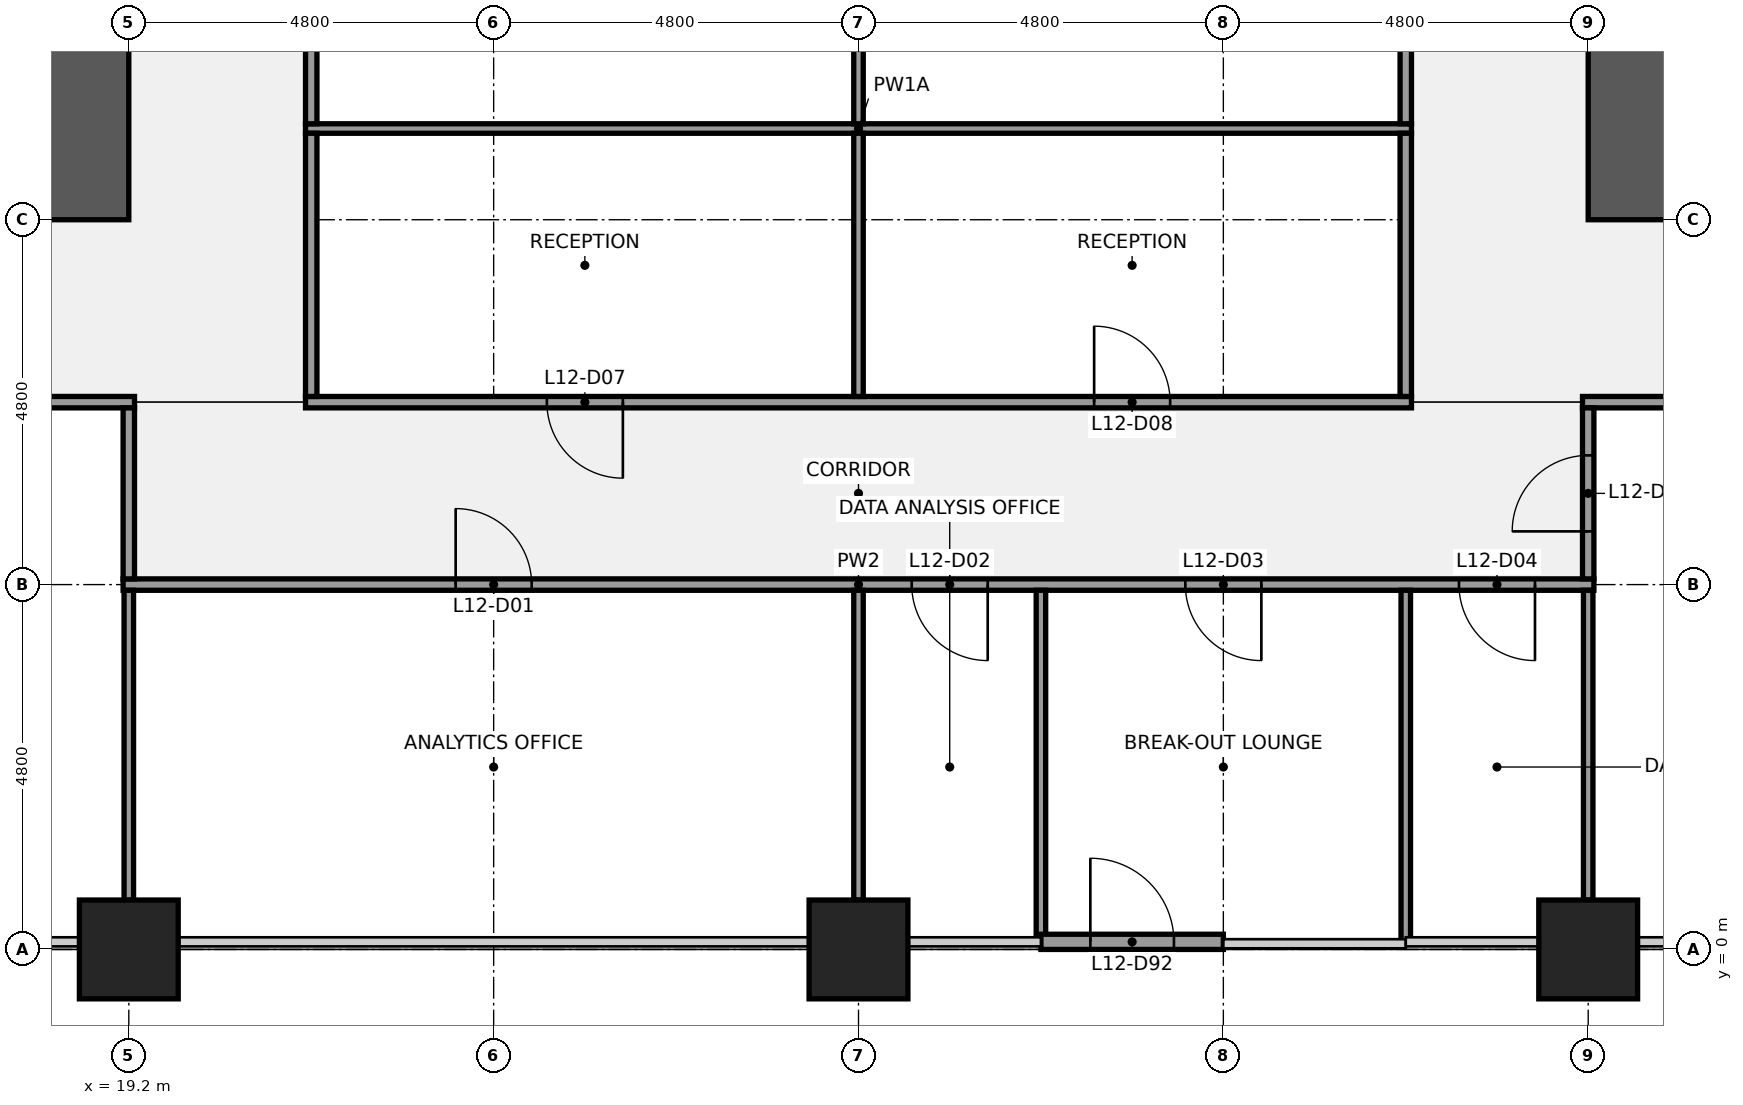
"""IFC4 building model, lengths in metres.
Left out: names, types, materials, properties, quantities, classifications, styles, units other than length and angle.
Written with IfcOpenShell. Run it as: python <this file> out.ifc"""

import sys

from ifc_helpers import new_model, si_unit, direction, frame, frame_2d, origin, origin_2d, place, context, subcontext, project, spatial, rectangle, extrude, element, fill, save


model = new_model("IFC4")
c1 = context("Model", 3, precision=1e-05, world=origin(), true_north=direction((0.0, 1.0)))
c2 = subcontext(c1, "Body", "Model", "MODEL_VIEW")
j1 = project(units=[si_unit("LENGTHUNIT", "METRE"), si_unit("PLANEANGLEUNIT", "RADIAN")], contexts=[c1])
p1 = place(None, origin())
s1 = spatial("IfcSite", under=j1, at=p1, CompositionType="ELEMENT")
p2 = place(p1, origin())
s2 = spatial("IfcBuilding", under=s1, at=p2, CompositionType="ELEMENT")
p3 = place(p2, frame((0.0, 0.0, 59.0)))
s3 = spatial("IfcBuildingStorey", under=s2, at=p3, CompositionType="ELEMENT", Elevation=59.0)
for number, where, z_axis, x_axis in (
    (1, (19.2, 0.0, 0.0), (0.0, 0.0, 1.0), (1.0, 0.0, 0.0)),
    (2, (28.8, 0.0, 0.0), (0.0, 0.0, 1.0), (1.0, 0.0, 0.0)),
    (3, (38.4, 0.0, 0.0), (0.0, 0.0, 1.0), (1.0, 0.0, 0.0)),
):
    element("IfcColumn", number, at=place(p3, frame(where, z_axis=z_axis, x_axis=x_axis)), inside=s3, PredefinedType="COLUMN", context=c2, shape_type="SweptSolid", body=[
        extrude(rectangle(XDim=1.3, YDim=1.3, at=origin_2d()), origin(), (0.0, 0.0, 1.0), 4.0),
    ])
p4 = place(p3, frame((18.6, 38.4, 0.0), z_axis=(0.0, 0.0, 1.0), x_axis=(0.0, -1.0, 0.0)))
e4 = element("IfcWall", 4, at=p4, inside=s3, PredefinedType="SHEAR", context=c2, shape_type="SweptSolid", body=[
    extrude(rectangle(XDim=28.8, YDim=1.2, at=frame_2d((14.4, 0.0))), origin(), (0.0, 0.0, 1.0), 3.84),
])
p5 = place(p4, frame((18.3, 0.0, 0.0)))
e5 = element("IfcOpeningElement", 5, at=p5, cuts=e4, PredefinedType="OPENING", context=c2, shape_type="SweptSolid", body=[
    extrude(rectangle(XDim=1.8, YDim=2.1, at=frame_2d((0.9, 1.05))), frame((0.0, 0.61, 0.0), z_axis=(0.0, -1.0, 0.0), x_axis=(1.0, 0.0, 0.0)), (0.0, 0.0, 1.0), 1.22),
])
p6 = place(p4, frame((8.7, 0.0, 0.0)))
e6 = element("IfcOpeningElement", 6, at=p6, cuts=e4, PredefinedType="OPENING", context=c2, shape_type="SweptSolid", body=[
    extrude(rectangle(XDim=1.8, YDim=2.1, at=frame_2d((0.9, 1.05))), frame((0.0, 0.61, 0.0), z_axis=(0.0, -1.0, 0.0), x_axis=(1.0, 0.0, 0.0)), (0.0, 0.0, 1.0), 1.22),
])
p7 = place(p3, frame((39.0, 9.6, 0.0), z_axis=(0.0, 0.0, 1.0), x_axis=(0.0, 1.0, 0.0)))
e7 = element("IfcWall", 7, at=p7, inside=s3, PredefinedType="SHEAR", context=c2, shape_type="SweptSolid", body=[
    extrude(rectangle(XDim=28.8, YDim=1.2, at=frame_2d((14.4, 0.0))), origin(), (0.0, 0.0, 1.0), 3.84),
])
p8 = place(p7, frame((8.7, 0.0, 0.0)))
e8 = element("IfcOpeningElement", 8, at=p8, cuts=e7, PredefinedType="OPENING", context=c2, shape_type="SweptSolid", body=[
    extrude(rectangle(XDim=1.8, YDim=2.1, at=frame_2d((0.9, 1.05))), frame((0.0, 0.61, 0.0), z_axis=(0.0, -1.0, 0.0), x_axis=(1.0, 0.0, 0.0)), (0.0, 0.0, 1.0), 1.22),
])
p9 = place(p7, frame((18.3, 0.0, 0.0)))
e9 = element("IfcOpeningElement", 9, at=p9, cuts=e7, PredefinedType="OPENING", context=c2, shape_type="SweptSolid", body=[
    extrude(rectangle(XDim=1.8, YDim=2.1, at=frame_2d((0.9, 1.05))), frame((0.0, 0.61, 0.0), z_axis=(0.0, -1.0, 0.0), x_axis=(1.0, 0.0, 0.0)), (0.0, 0.0, 1.0), 1.22),
])
p10 = place(p3, frame((19.125, 4.8, 0.0), z_axis=(0.0, 0.0, 1.0), x_axis=(1.0, 0.0, 0.0)))
e10 = element("IfcWall", 10, at=p10, inside=s3, PredefinedType="PARTITIONING", context=c2, shape_type="SweptSolid", body=[
    extrude(rectangle(XDim=19.35, YDim=0.15, at=frame_2d((9.675, 0.0))), origin(), (0.0, 0.0, 1.0), 2.87),
])
p11 = place(p10, frame((4.375, 0.0, 0.0)))
e11 = element("IfcOpeningElement", 11, at=p11, cuts=e10, PredefinedType="OPENING", context=c2, shape_type="SweptSolid", body=[
    extrude(rectangle(XDim=1.0, YDim=2.1, at=frame_2d((0.5, 1.05))), frame((0.0, 0.085, 0.0), z_axis=(0.0, -1.0, 0.0), x_axis=(1.0, 0.0, 0.0)), (0.0, 0.0, 1.0), 0.17),
])
p12 = place(p10, frame((10.375, 0.0, 0.0)))
e12 = element("IfcOpeningElement", 12, at=p12, cuts=e10, PredefinedType="OPENING", context=c2, shape_type="SweptSolid", body=[
    extrude(rectangle(XDim=1.0, YDim=2.1, at=frame_2d((0.5, 1.05))), frame((0.0, 0.085, 0.0), z_axis=(0.0, -1.0, 0.0), x_axis=(1.0, 0.0, 0.0)), (0.0, 0.0, 1.0), 0.17),
])
p13 = place(p10, frame((13.975, 0.0, 0.0)))
e13 = element("IfcOpeningElement", 13, at=p13, cuts=e10, PredefinedType="OPENING", context=c2, shape_type="SweptSolid", body=[
    extrude(rectangle(XDim=1.0, YDim=2.1, at=frame_2d((0.5, 1.05))), frame((0.0, 0.085, 0.0), z_axis=(0.0, -1.0, 0.0), x_axis=(1.0, 0.0, 0.0)), (0.0, 0.0, 1.0), 0.17),
])
p14 = place(p10, frame((17.575, 0.0, 0.0)))
e14 = element("IfcOpeningElement", 14, at=p14, cuts=e10, PredefinedType="OPENING", context=c2, shape_type="SweptSolid", body=[
    extrude(rectangle(XDim=1.0, YDim=2.1, at=frame_2d((0.5, 1.05))), frame((0.0, 0.085, 0.0), z_axis=(0.0, -1.0, 0.0), x_axis=(1.0, 0.0, 0.0)), (0.0, 0.0, 1.0), 0.17),
])
p15 = place(p3, frame((9.525, 7.2, 0.0), z_axis=(0.0, 0.0, 1.0), x_axis=(1.0, 0.0, 0.0)))
e15 = element("IfcWall", 15, at=p15, inside=s3, PredefinedType="PARTITIONING", context=c2, shape_type="SweptSolid", body=[
    extrude(rectangle(XDim=9.75, YDim=0.15, at=frame_2d((4.875, 0.0))), origin(), (0.0, 0.0, 1.0), 2.87),
])
p16 = place(p15, frame((1.975, 0.0, 0.0)))
e16 = element("IfcOpeningElement", 16, at=p16, cuts=e15, PredefinedType="OPENING", context=c2, shape_type="SweptSolid", body=[
    extrude(rectangle(XDim=1.0, YDim=2.1, at=frame_2d((0.5, 1.05))), frame((0.0, 0.085, 0.0), z_axis=(0.0, -1.0, 0.0), x_axis=(1.0, 0.0, 0.0)), (0.0, 0.0, 1.0), 0.17),
])
p17 = place(p15, frame((6.775, 0.0, 0.0)))
e17 = element("IfcOpeningElement", 17, at=p17, cuts=e15, PredefinedType="OPENING", context=c2, shape_type="SweptSolid", body=[
    extrude(rectangle(XDim=1.0, YDim=2.1, at=frame_2d((0.5, 1.05))), frame((0.0, 0.085, 0.0), z_axis=(0.0, -1.0, 0.0), x_axis=(1.0, 0.0, 0.0)), (0.0, 0.0, 1.0), 0.17),
])
p18 = place(p3, frame((21.525, 7.2, 0.0), z_axis=(0.0, 0.0, 1.0), x_axis=(1.0, 0.0, 0.0)))
e18 = element("IfcWall", 18, at=p18, inside=s3, PredefinedType="PARTITIONING", context=c2, shape_type="SweptSolid", body=[
    extrude(rectangle(XDim=14.55, YDim=0.15, at=frame_2d((7.275, 0.0))), origin(), (0.0, 0.0, 1.0), 2.87),
])
p19 = place(p18, frame((3.175, 0.0, 0.0)))
e19 = element("IfcOpeningElement", 19, at=p19, cuts=e18, PredefinedType="OPENING", context=c2, shape_type="SweptSolid", body=[
    extrude(rectangle(XDim=1.0, YDim=2.1, at=frame_2d((0.5, 1.05))), frame((0.0, 0.085, 0.0), z_axis=(0.0, -1.0, 0.0), x_axis=(1.0, 0.0, 0.0)), (0.0, 0.0, 1.0), 0.17),
])
p20 = place(p18, frame((10.375, 0.0, 0.0)))
e20 = element("IfcOpeningElement", 20, at=p20, cuts=e18, PredefinedType="OPENING", context=c2, shape_type="SweptSolid", body=[
    extrude(rectangle(XDim=1.0, YDim=2.1, at=frame_2d((0.5, 1.05))), frame((0.0, 0.085, 0.0), z_axis=(0.0, -1.0, 0.0), x_axis=(1.0, 0.0, 0.0)), (0.0, 0.0, 1.0), 0.17),
])
p21 = place(p3, frame((38.325, 7.2, 0.0), z_axis=(0.0, 0.0, 1.0), x_axis=(1.0, 0.0, 0.0)))
e21 = element("IfcWall", 21, at=p21, inside=s3, PredefinedType="PARTITIONING", context=c2, shape_type="SweptSolid", body=[
    extrude(rectangle(XDim=9.75, YDim=0.15, at=frame_2d((4.875, 0.0))), origin(), (0.0, 0.0, 1.0), 2.87),
])
p22 = place(p21, frame((5.575, 0.0, 0.0)))
e22 = element("IfcOpeningElement", 22, at=p22, cuts=e21, PredefinedType="OPENING", context=c2, shape_type="SweptSolid", body=[
    extrude(rectangle(XDim=1.0, YDim=2.1, at=frame_2d((0.5, 1.05))), frame((0.0, 0.085, 0.0), z_axis=(0.0, -1.0, 0.0), x_axis=(1.0, 0.0, 0.0)), (0.0, 0.0, 1.0), 0.17),
])
p23 = place(p3, frame((21.525, 10.8, 0.0), z_axis=(0.0, 0.0, 1.0), x_axis=(1.0, 0.0, 0.0)))
e23 = element("IfcWall", 23, at=p23, inside=s3, PredefinedType="PARTITIONING", context=c2, shape_type="SweptSolid", body=[
    extrude(rectangle(XDim=14.55, YDim=0.125, at=frame_2d((7.275, 0.0))), origin(), (0.0, 0.0, 1.0), 2.87),
])
p24 = place(p3, frame((19.2, 0.65, 0.0), z_axis=(0.0, 0.0, 1.0), x_axis=(0.0, 1.0, 0.0)))
e24 = element("IfcWall", 24, at=p24, inside=s3, PredefinedType="PARTITIONING", context=c2, shape_type="SweptSolid", body=[
    extrude(rectangle(XDim=4.075, YDim=0.125, at=frame_2d((2.038, 0.0))), origin(), (0.0, 0.0, 1.0), 2.87),
])
p25 = place(p3, frame((19.2, 4.875, 0.0), z_axis=(0.0, 0.0, 1.0), x_axis=(0.0, 1.0, 0.0)))
e25 = element("IfcWall", 25, at=p25, inside=s3, PredefinedType="PARTITIONING", context=c2, shape_type="SweptSolid", body=[
    extrude(rectangle(XDim=2.25, YDim=0.15, at=frame_2d((1.125, 0.0))), origin(), (0.0, 0.0, 1.0), 2.87),
])
p26 = place(p3, frame((21.6, 7.275, 0.0), z_axis=(0.0, 0.0, 1.0), x_axis=(0.0, 1.0, 0.0)))
e26 = element("IfcWall", 26, at=p26, inside=s3, PredefinedType="PARTITIONING", context=c2, shape_type="SweptSolid", body=[
    extrude(rectangle(XDim=3.463, YDim=0.15, at=frame_2d((1.731, 0.0))), origin(), (0.0, 0.0, 1.0), 2.87),
])
p27 = place(p3, frame((21.6, 10.863, 0.0), z_axis=(0.0, 0.0, 1.0), x_axis=(0.0, 1.0, 0.0)))
e27 = element("IfcWall", 27, at=p27, inside=s3, PredefinedType="PARTITIONING", context=c2, shape_type="SweptSolid", body=[
    extrude(rectangle(XDim=7.075, YDim=0.15, at=frame_2d((3.538, 0.0))), origin(), (0.0, 0.0, 1.0), 2.87),
])
p28 = place(p27, frame((3.038, 0.0, 0.0)))
e28 = element("IfcOpeningElement", 28, at=p28, cuts=e27, PredefinedType="OPENING", context=c2, shape_type="SweptSolid", body=[
    extrude(rectangle(XDim=1.0, YDim=2.1, at=frame_2d((0.5, 1.05))), frame((0.0, 0.085, 0.0), z_axis=(0.0, -1.0, 0.0), x_axis=(1.0, 0.0, 0.0)), (0.0, 0.0, 1.0), 0.17),
])
p29 = place(p3, frame((28.8, 0.65, 0.0), z_axis=(0.0, 0.0, 1.0), x_axis=(0.0, 1.0, 0.0)))
e29 = element("IfcWall", 29, at=p29, inside=s3, PredefinedType="PARTITIONING", context=c2, shape_type="SweptSolid", body=[
    extrude(rectangle(XDim=4.075, YDim=0.125, at=frame_2d((2.038, 0.0))), origin(), (0.0, 0.0, 1.0), 2.87),
])
p30 = place(p3, frame((28.8, 7.275, 0.0), z_axis=(0.0, 0.0, 1.0), x_axis=(0.0, 1.0, 0.0)))
e30 = element("IfcWall", 30, at=p30, inside=s3, PredefinedType="PARTITIONING", context=c2, shape_type="SweptSolid", body=[
    extrude(rectangle(XDim=3.463, YDim=0.125, at=frame_2d((1.731, 0.0))), origin(), (0.0, 0.0, 1.0), 2.87),
])
p31 = place(p3, frame((28.8, 10.863, 0.0), z_axis=(0.0, 0.0, 1.0), x_axis=(0.0, 1.0, 0.0)))
e31 = element("IfcWall", 31, at=p31, inside=s3, PredefinedType="PARTITIONING", context=c2, shape_type="SweptSolid", body=[
    extrude(rectangle(XDim=7.075, YDim=0.125, at=frame_2d((3.538, 0.0))), origin(), (0.0, 0.0, 1.0), 2.87),
])
for number, where, z_axis, x_axis in (
    (32, (31.2, 0.1, 0.0), (0.0, 0.0, 1.0), (0.0, 1.0, 0.0)),
    (33, (36.0, 0.1, 0.0), (0.0, 0.0, 1.0), (0.0, 1.0, 0.0)),
):
    element("IfcWall", number, at=place(p3, frame(where, z_axis=z_axis, x_axis=x_axis)), inside=s3, PredefinedType="PARTITIONING", context=c2, shape_type="SweptSolid", body=[
        extrude(rectangle(XDim=4.625, YDim=0.125, at=frame_2d((2.312, 0.0))), origin(), (0.0, 0.0, 1.0), 2.87),
    ])
p32 = place(p3, frame((36.0, 7.275, 0.0), z_axis=(0.0, 0.0, 1.0), x_axis=(0.0, 1.0, 0.0)))
e34 = element("IfcWall", 34, at=p32, inside=s3, PredefinedType="PARTITIONING", context=c2, shape_type="SweptSolid", body=[
    extrude(rectangle(XDim=3.463, YDim=0.15, at=frame_2d((1.731, 0.0))), origin(), (0.0, 0.0, 1.0), 2.87),
])
p33 = place(p3, frame((36.0, 10.863, 0.0), z_axis=(0.0, 0.0, 1.0), x_axis=(0.0, 1.0, 0.0)))
e35 = element("IfcWall", 35, at=p33, inside=s3, PredefinedType="PARTITIONING", context=c2, shape_type="SweptSolid", body=[
    extrude(rectangle(XDim=7.075, YDim=0.15, at=frame_2d((3.538, 0.0))), origin(), (0.0, 0.0, 1.0), 2.87),
])
p34 = place(p33, frame((3.038, 0.0, 0.0)))
e36 = element("IfcOpeningElement", 36, at=p34, cuts=e35, PredefinedType="OPENING", context=c2, shape_type="SweptSolid", body=[
    extrude(rectangle(XDim=1.0, YDim=2.1, at=frame_2d((0.5, 1.05))), frame((0.0, 0.085, 0.0), z_axis=(0.0, -1.0, 0.0), x_axis=(1.0, 0.0, 0.0)), (0.0, 0.0, 1.0), 0.17),
])
p35 = place(p3, frame((38.4, 0.65, 0.0), z_axis=(0.0, 0.0, 1.0), x_axis=(0.0, 1.0, 0.0)))
e37 = element("IfcWall", 37, at=p35, inside=s3, PredefinedType="PARTITIONING", context=c2, shape_type="SweptSolid", body=[
    extrude(rectangle(XDim=4.075, YDim=0.125, at=frame_2d((2.038, 0.0))), origin(), (0.0, 0.0, 1.0), 2.87),
])
p36 = place(p3, frame((38.4, 4.875, 0.0), z_axis=(0.0, 0.0, 1.0), x_axis=(0.0, 1.0, 0.0)))
e38 = element("IfcWall", 38, at=p36, inside=s3, PredefinedType="PARTITIONING", context=c2, shape_type="SweptSolid", body=[
    extrude(rectangle(XDim=2.25, YDim=0.15, at=frame_2d((1.125, 0.0))), origin(), (0.0, 0.0, 1.0), 2.87),
])
p37 = place(p36, frame((0.625, 0.0, 0.0)))
e39 = element("IfcOpeningElement", 39, at=p37, cuts=e38, PredefinedType="OPENING", context=c2, shape_type="SweptSolid", body=[
    extrude(rectangle(XDim=1.0, YDim=2.1, at=frame_2d((0.5, 1.05))), frame((0.0, 0.085, 0.0), z_axis=(0.0, -1.0, 0.0), x_axis=(1.0, 0.0, 0.0)), (0.0, 0.0, 1.0), 0.17),
])
p38 = place(p3, frame((31.2, 0.1, 0.0), z_axis=(0.0, 0.0, 1.0), x_axis=(1.0, 0.0, 0.0)))
e40 = element("IfcWall", 40, at=p38, inside=s3, PredefinedType="SOLIDWALL", context=c2, shape_type="SweptSolid", body=[
    extrude(rectangle(XDim=2.4, YDim=0.2, at=frame_2d((1.2, 0.0))), origin(), (0.0, 0.0, 1.0), 3.314),
])
p39 = place(p38, frame((0.65, 0.0, 0.0)))
e41 = element("IfcOpeningElement", 41, at=p39, cuts=e40, PredefinedType="OPENING", context=c2, shape_type="SweptSolid", body=[
    extrude(rectangle(XDim=1.1, YDim=2.1, at=frame_2d((0.55, 1.05))), frame((0.0, 0.11, 0.0), z_axis=(0.0, -1.0, 0.0), x_axis=(1.0, 0.0, 0.0)), (0.0, 0.0, 1.0), 0.22),
])
for number, where, z_axis, x_axis in (
    (42, (19.2, -1.075, 0.0), (0.0, 0.0, 1.0), (1.0, 0.0, 0.0)),
    (43, (38.4, -1.075, 0.0), (0.0, 0.0, 1.0), (1.0, 0.0, 0.0)),
):
    element("IfcColumn", number, at=place(p3, frame(where, z_axis=z_axis, x_axis=x_axis)), inside=s3, PredefinedType="PILASTER", context=c2, shape_type="SweptSolid", body=[
        extrude(rectangle(XDim=4.2, YDim=0.85, at=origin_2d()), origin(), (0.0, 0.0, 1.0), 4.0),
    ])
p40 = place(p11, origin())
e44 = element("IfcDoor", 44, at=p40, inside=s3, OperationType="SINGLE_SWING_LEFT", PredefinedType="DOOR", context=c2, shape_type="SweptSolid", body=[
    extrude(rectangle(XDim=1.0, YDim=2.1, at=frame_2d((0.5, 1.05))), frame((0.0, 0.025, 0.0), z_axis=(0.0, -1.0, 0.0), x_axis=(1.0, 0.0, 0.0)), (0.0, 0.0, 1.0), 0.05),
])
fill(e11, e44)
p41 = place(p12, origin())
e45 = element("IfcDoor", 45, at=p41, inside=s3, OperationType="SINGLE_SWING_RIGHT", PredefinedType="DOOR", context=c2, shape_type="SweptSolid", body=[
    extrude(rectangle(XDim=1.0, YDim=2.1, at=frame_2d((0.5, 1.05))), frame((0.0, 0.025, 0.0), z_axis=(0.0, -1.0, 0.0), x_axis=(1.0, 0.0, 0.0)), (0.0, 0.0, 1.0), 0.05),
])
fill(e12, e45)
p42 = place(p13, origin())
e46 = element("IfcDoor", 46, at=p42, inside=s3, OperationType="SINGLE_SWING_RIGHT", PredefinedType="DOOR", context=c2, shape_type="SweptSolid", body=[
    extrude(rectangle(XDim=1.0, YDim=2.1, at=frame_2d((0.5, 1.05))), frame((0.0, 0.025, 0.0), z_axis=(0.0, -1.0, 0.0), x_axis=(1.0, 0.0, 0.0)), (0.0, 0.0, 1.0), 0.05),
])
fill(e13, e46)
p43 = place(p14, origin())
e47 = element("IfcDoor", 47, at=p43, inside=s3, OperationType="SINGLE_SWING_RIGHT", PredefinedType="DOOR", context=c2, shape_type="SweptSolid", body=[
    extrude(rectangle(XDim=1.0, YDim=2.1, at=frame_2d((0.5, 1.05))), frame((0.0, 0.025, 0.0), z_axis=(0.0, -1.0, 0.0), x_axis=(1.0, 0.0, 0.0)), (0.0, 0.0, 1.0), 0.05),
])
fill(e14, e47)
p44 = place(p19, origin())
e48 = element("IfcDoor", 48, at=p44, inside=s3, OperationType="SINGLE_SWING_RIGHT", PredefinedType="DOOR", context=c2, shape_type="SweptSolid", body=[
    extrude(rectangle(XDim=1.0, YDim=2.1, at=frame_2d((0.5, 1.05))), frame((0.0, 0.025, 0.0), z_axis=(0.0, -1.0, 0.0), x_axis=(1.0, 0.0, 0.0)), (0.0, 0.0, 1.0), 0.05),
])
fill(e19, e48)
p45 = place(p20, origin())
e49 = element("IfcDoor", 49, at=p45, inside=s3, OperationType="SINGLE_SWING_LEFT", PredefinedType="DOOR", context=c2, shape_type="SweptSolid", body=[
    extrude(rectangle(XDim=1.0, YDim=2.1, at=frame_2d((0.5, 1.05))), frame((0.0, 0.025, 0.0), z_axis=(0.0, -1.0, 0.0), x_axis=(1.0, 0.0, 0.0)), (0.0, 0.0, 1.0), 0.05),
])
fill(e20, e49)
p46 = place(p37, origin())
e50 = element("IfcDoor", 50, at=p46, inside=s3, OperationType="SINGLE_SWING_LEFT", PredefinedType="DOOR", context=c2, shape_type="SweptSolid", body=[
    extrude(rectangle(XDim=1.0, YDim=2.1, at=frame_2d((0.5, 1.05))), frame((0.0, 0.025, 0.0), z_axis=(0.0, -1.0, 0.0), x_axis=(1.0, 0.0, 0.0)), (0.0, 0.0, 1.0), 0.05),
])
fill(e39, e50)
p47 = place(p39, origin())
e51 = element("IfcDoor", 51, at=p47, inside=s3, OperationType="SINGLE_SWING_LEFT", PredefinedType="DOOR", context=c2, shape_type="SweptSolid", body=[
    extrude(rectangle(XDim=1.1, YDim=2.1, at=frame_2d((0.55, 1.05))), frame((0.0, 0.025, 0.0), z_axis=(0.0, -1.0, 0.0), x_axis=(1.0, 0.0, 0.0)), (0.0, 0.0, 1.0), 0.05),
])
fill(e41, e51)
save(model, sys.argv[1])
